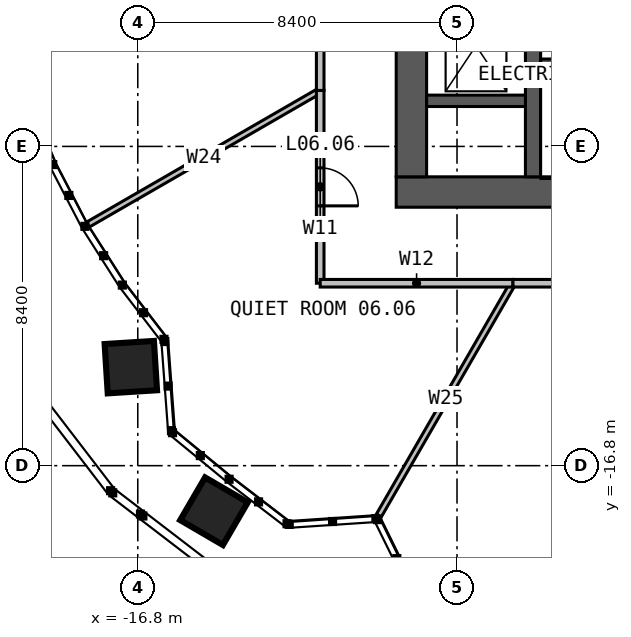
"""IFC4 building model, lengths in metres.
Left out: names, types, materials, properties, quantities, classifications, styles, units other than length and angle.
Written with IfcOpenShell. Run it as: python <this file> out.ifc"""

import sys

from ifc_helpers import new_model, si_unit, direction, frame, frame_2d, origin, place, context, subcontext, project, spatial, rectangle, extrude, element, fill, save


model = new_model("IFC4")
c1 = context("Model", 3, precision=1e-05, world=origin(), true_north=direction((0.0, 1.0)))
c2 = subcontext(c1, "Body", "Model", "MODEL_VIEW")
j1 = project(units=[si_unit("LENGTHUNIT", "METRE"), si_unit("PLANEANGLEUNIT", "RADIAN")], contexts=[c1])
p1 = place(None, origin())
s1 = spatial("IfcSite", under=j1, at=p1, CompositionType="ELEMENT")
p2 = place(p1, origin())
s2 = spatial("IfcBuilding", under=s1, at=p2, CompositionType="ELEMENT")
p3 = place(p2, frame((0.0, 0.0, 29.0)))
s3 = spatial("IfcBuildingStorey", under=s2, at=p3, CompositionType="ELEMENT", Elevation=29.0)
p4 = place(p3, frame((10.0, -9.6, 0.0), z_axis=(0.0, 0.0, 1.0), x_axis=(-1.0, 0.0, 0.0)))
e1 = element("IfcWall", 1, at=p4, inside=s3, PredefinedType="SOLIDWALL", context=c2, shape_type="SweptSolid", body=[
    extrude(rectangle(XDim=20.0, YDim=0.8, at=frame_2d((10.0, 0.0))), origin(), (0.0, 0.0, 1.0), 4.0),
])
p5 = place(p4, frame((6.875, 0.0, 0.0)))
e2 = element("IfcOpeningElement", 2, at=p5, cuts=e1, PredefinedType="OPENING", context=c2, shape_type="SweptSolid", body=[
    extrude(rectangle(XDim=1.2, YDim=2.2, at=frame_2d((0.6, 1.1))), frame((0.0, 0.41, 0.0), z_axis=(0.0, -1.0, 0.0), x_axis=(1.0, 0.0, 0.0)), (0.0, 0.0, 1.0), 0.82),
])
p6 = place(p3, frame((-9.6, 9.2, 0.0), z_axis=(0.0, 0.0, 1.0), x_axis=(0.0, -1.0, 0.0)))
e3 = element("IfcWall", 3, at=p6, inside=s3, PredefinedType="SOLIDWALL", context=c2, shape_type="SweptSolid", body=[
    extrude(rectangle(XDim=18.4, YDim=0.8, at=frame_2d((9.2, 0.0))), origin(), (0.0, 0.0, 1.0), 4.0),
])
p7 = place(p3, frame((-6.4, -9.2, 0.0), z_axis=(0.0, 0.0, 1.0), x_axis=(0.0, 1.0, 0.0)))
e4 = element("IfcWall", 4, at=p7, inside=s3, PredefinedType="SOLIDWALL", context=c2, shape_type="SweptSolid", body=[
    extrude(rectangle(XDim=18.4, YDim=0.4, at=frame_2d((9.2, 0.0))), origin(), (0.0, 0.0, 1.0), 4.0),
])
p8 = place(p7, frame((8.7, 0.0, 0.0)))
e5 = element("IfcOpeningElement", 5, at=p8, cuts=e4, PredefinedType="OPENING", context=c2, shape_type="SweptSolid", body=[
    extrude(rectangle(XDim=1.0, YDim=2.2, at=frame_2d((0.5, 1.1))), frame((0.0, 0.21, 0.0), z_axis=(0.0, -1.0, 0.0), x_axis=(1.0, 0.0, 0.0)), (0.0, 0.0, 1.0), 0.42),
])
p9 = place(p3, frame((-6.2, -6.2, 0.0), z_axis=(0.0, 0.0, 1.0), x_axis=(1.0, 0.0, 0.0)))
e6 = element("IfcWall", 6, at=p9, inside=s3, PredefinedType="SOLIDWALL", context=c2, shape_type="SweptSolid", body=[
    extrude(rectangle(XDim=7.4, YDim=0.2, at=frame_2d((3.7, 0.0))), origin(), (0.0, 0.0, 1.0), 4.0),
])
p10 = place(p3, frame((-9.2, -7.2, 0.0), z_axis=(0.0, 0.0, 1.0), x_axis=(1.0, 0.0, 0.0)))
e7 = element("IfcWall", 7, at=p10, inside=s3, PredefinedType="SOLIDWALL", context=c2, shape_type="SweptSolid", body=[
    extrude(rectangle(XDim=2.6, YDim=0.3, at=frame_2d((1.3, 0.0))), origin(), (0.0, 0.0, 1.0), 4.0),
])
for number, where, z_axis, x_axis in (
    (8, (-12.0, -6.928, 0.0), (0.0, 0.0, 1.0), (-0.866, -0.5, 0.0)),
    (9, (-6.928, -12.0, 0.0), (0.0, 0.0, 1.0), (-0.5, -0.866, 0.0)),
):
    element("IfcWall", number, at=place(p3, frame(where, z_axis=z_axis, x_axis=x_axis)), inside=s3, PredefinedType="PARTITIONING", context=c2, shape_type="SweptSolid", body=[
        extrude(rectangle(XDim=7.057, YDim=0.15, at=frame_2d((3.529, 0.0))), origin(), (0.0, 0.0, 1.0), 2.79),
    ])
p11 = place(p3, frame((-12.0, 0.0, 0.0), z_axis=(0.0, 0.0, 1.0), x_axis=(0.0, -1.0, 0.0)))
e10 = element("IfcWall", 10, at=p11, inside=s3, PredefinedType="PARTITIONING", context=c2, shape_type="SweptSolid", body=[
    extrude(rectangle(XDim=6.928, YDim=0.2, at=frame_2d((3.464, 0.0))), origin(), (0.0, 0.0, 1.0), 3.8),
])
p12 = place(p11, frame((2.564, 0.0, 0.0)))
e11 = element("IfcOpeningElement", 11, at=p12, cuts=e10, PredefinedType="OPENING", context=c2, shape_type="SweptSolid", body=[
    extrude(rectangle(XDim=1.8, YDim=2.2, at=frame_2d((0.9, 1.1))), frame((0.0, 0.11, 0.0), z_axis=(0.0, -1.0, 0.0), x_axis=(1.0, 0.0, 0.0)), (0.0, 0.0, 1.0), 0.22),
])
p13 = place(p3, frame((-12.0, -6.928, 0.0), z_axis=(0.0, 0.0, 1.0), x_axis=(0.0, -1.0, 0.0)))
e12 = element("IfcWall", 12, at=p13, inside=s3, PredefinedType="PARTITIONING", context=c2, shape_type="SweptSolid", body=[
    extrude(rectangle(XDim=5.072, YDim=0.2, at=frame_2d((2.536, 0.0))), origin(), (0.0, 0.0, 1.0), 3.8),
])
p14 = place(p13, frame((2.036, 0.0, 0.0)))
e13 = element("IfcOpeningElement", 13, at=p14, cuts=e12, PredefinedType="OPENING", context=c2, shape_type="SweptSolid", body=[
    extrude(rectangle(XDim=1.0, YDim=2.2, at=frame_2d((0.5, 1.1))), frame((0.0, 0.11, 0.0), z_axis=(0.0, -1.0, 0.0), x_axis=(1.0, 0.0, 0.0)), (0.0, 0.0, 1.0), 0.22),
])
p15 = place(p3, frame((-12.0, -12.0, 0.0), z_axis=(0.0, 0.0, 1.0), x_axis=(1.0, 0.0, 0.0)))
e14 = element("IfcWall", 14, at=p15, inside=s3, PredefinedType="PARTITIONING", context=c2, shape_type="SweptSolid", body=[
    extrude(rectangle(XDim=5.072, YDim=0.2, at=frame_2d((2.536, 0.0))), origin(), (0.0, 0.0, 1.0), 3.8),
])
p16 = place(p3, frame((-6.928, -12.0, 0.0), z_axis=(0.0, 0.0, 1.0), x_axis=(1.0, 0.0, 0.0)))
e15 = element("IfcWall", 15, at=p16, inside=s3, PredefinedType="PARTITIONING", context=c2, shape_type="SweptSolid", body=[
    extrude(rectangle(XDim=10.144, YDim=0.2, at=frame_2d((5.072, 0.0))), origin(), (0.0, 0.0, 1.0), 3.8),
])
p17 = place(p16, frame((4.172, 0.0, 0.0)))
e16 = element("IfcOpeningElement", 16, at=p17, cuts=e15, PredefinedType="OPENING", context=c2, shape_type="SweptSolid", body=[
    extrude(rectangle(XDim=1.8, YDim=2.2, at=frame_2d((0.9, 1.1))), frame((0.0, 0.11, 0.0), z_axis=(0.0, -1.0, 0.0), x_axis=(1.0, 0.0, 0.0)), (0.0, 0.0, 1.0), 0.22),
])
p18 = place(p14, origin())
e17 = element("IfcDoor", 17, at=p18, inside=s3, OperationType="SINGLE_SWING_RIGHT", PredefinedType="DOOR", context=c2, shape_type="SweptSolid", body=[
    extrude(rectangle(XDim=1.0, YDim=2.2, at=frame_2d((0.5, 1.1))), frame((0.0, 0.025, 0.0), z_axis=(0.0, -1.0, 0.0), x_axis=(1.0, 0.0, 0.0)), (0.0, 0.0, 1.0), 0.05),
])
fill(e13, e17)
save(model, sys.argv[1])
